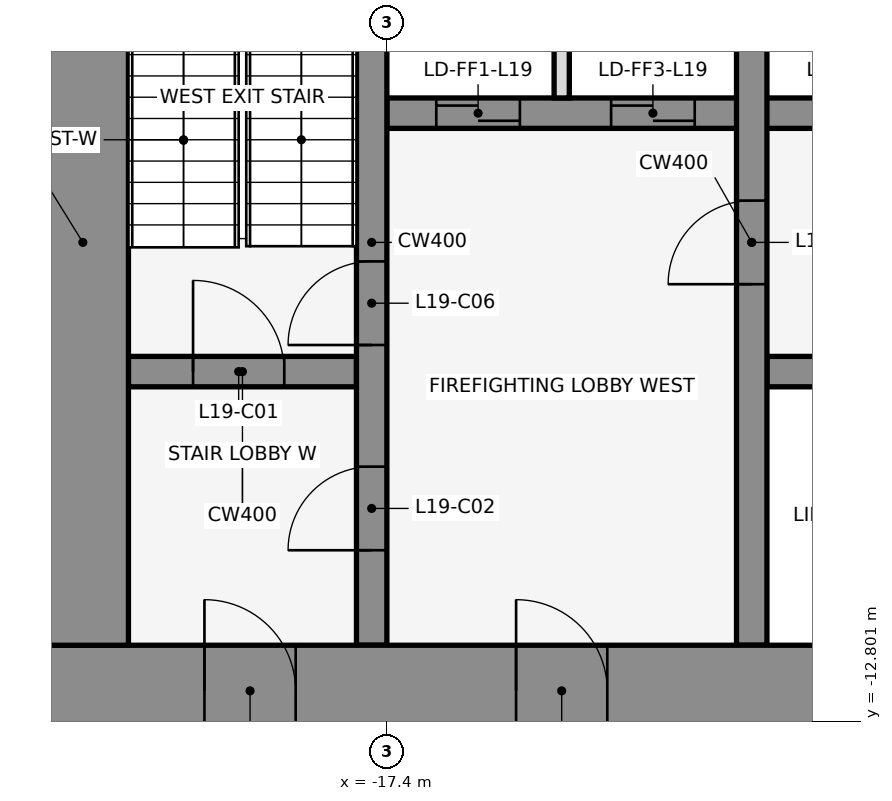
"""IFC4 building model, lengths in metres.
Left out: names, types, materials, properties, quantities, classifications, styles, units other than length and angle.
Written with IfcOpenShell. Run it as: python <this file> out.ifc"""

import sys

from ifc_helpers import new_model, si_unit, direction, frame, frame_2d, origin, place, context, subcontext, project, spatial, rectangle, extrude, element, fill, save


model = new_model("IFC4")
c1 = context("Model", 3, precision=1e-05, world=origin(), true_north=direction((0.0, 1.0)))
c2 = subcontext(c1, "Body", "Model", "MODEL_VIEW")
j1 = project(units=[si_unit("LENGTHUNIT", "METRE"), si_unit("PLANEANGLEUNIT", "RADIAN")], contexts=[c1])
p1 = place(None, origin())
s1 = spatial("IfcSite", under=j1, at=p1, CompositionType="ELEMENT")
p2 = place(p1, origin())
s2 = spatial("IfcBuilding", under=s1, at=p2, CompositionType="ELEMENT")
p3 = place(p2, frame((0.0, 0.0, 94.0)))
s3 = spatial("IfcBuildingStorey", under=s2, at=p3, CompositionType="ELEMENT", Elevation=94.0)
p4 = place(p3, frame((-20.8, -8.2, 0.0), z_axis=(0.0, 0.0, 1.0), x_axis=(1.0, 0.0, 0.0)))
e1 = element("IfcWall", 1, at=p4, inside=s3, PredefinedType="SHEAR", context=c2, shape_type="SweptSolid", body=[
    extrude(rectangle(XDim=3.0, YDim=0.4, at=frame_2d((1.5, 0.0))), origin(), (0.0, 0.0, 1.0), 4.1),
])
p5 = place(p4, frame((0.85, 0.0, 0.0)))
e2 = element("IfcOpeningElement", 2, at=p5, cuts=e1, PredefinedType="OPENING", context=c2, shape_type="SweptSolid", body=[
    extrude(rectangle(XDim=1.2, YDim=2.1, at=frame_2d((0.6, 1.05))), frame((0.0, 0.212, 0.0), z_axis=(0.0, -1.0, 0.0), x_axis=(1.0, 0.0, 0.0)), (0.0, 0.0, 1.0), 0.424),
])
p6 = place(p3, frame((-12.4, -8.2, 0.0), z_axis=(0.0, 0.0, 1.0), x_axis=(1.0, 0.0, 0.0)))
e3 = element("IfcWall", 3, at=p6, inside=s3, PredefinedType="SHEAR", context=c2, shape_type="SweptSolid", body=[
    extrude(rectangle(XDim=6.0, YDim=0.4, at=frame_2d((3.0, 0.0))), origin(), (0.0, 0.0, 1.0), 4.1),
])
p7 = place(p3, frame((-17.4, -4.8, 0.0), z_axis=(0.0, 0.0, 1.0), x_axis=(1.0, 0.0, 0.0)))
e4 = element("IfcWall", 4, at=p7, inside=s3, PredefinedType="SHEAR", context=c2, shape_type="SweptSolid", body=[
    extrude(rectangle(XDim=13.6, YDim=0.4, at=frame_2d((6.8, 0.0))), origin(), (0.0, 0.0, 1.0), 4.1),
])
p8 = place(p7, frame((0.65, 0.0, 0.0)))
e5 = element("IfcOpeningElement", 5, at=p8, cuts=e4, PredefinedType="OPENING", context=c2, shape_type="SweptSolid", body=[
    extrude(rectangle(XDim=1.1, YDim=2.1, at=frame_2d((0.55, 1.05))), frame((0.0, 0.212, 0.0), z_axis=(0.0, -1.0, 0.0), x_axis=(1.0, 0.0, 0.0)), (0.0, 0.0, 1.0), 0.424),
])
p9 = place(p7, frame((2.95, 0.0, 0.0)))
e6 = element("IfcOpeningElement", 6, at=p9, cuts=e4, PredefinedType="OPENING", context=c2, shape_type="SweptSolid", body=[
    extrude(rectangle(XDim=1.1, YDim=2.1, at=frame_2d((0.55, 1.05))), frame((0.0, 0.212, 0.0), z_axis=(0.0, -1.0, 0.0), x_axis=(1.0, 0.0, 0.0)), (0.0, 0.0, 1.0), 0.424),
])
p10 = place(p7, frame((5.65, 0.0, 0.0)))
e7 = element("IfcOpeningElement", 7, at=p10, cuts=e4, PredefinedType="OPENING", context=c2, shape_type="SweptSolid", body=[
    extrude(rectangle(XDim=1.2, YDim=2.1, at=frame_2d((0.6, 1.05))), frame((0.0, 0.212, 0.0), z_axis=(0.0, -1.0, 0.0), x_axis=(1.0, 0.0, 0.0)), (0.0, 0.0, 1.0), 0.424),
])
p11 = place(p7, frame((8.65, 0.0, 0.0)))
e8 = element("IfcOpeningElement", 8, at=p11, cuts=e4, PredefinedType="OPENING", context=c2, shape_type="SweptSolid", body=[
    extrude(rectangle(XDim=1.2, YDim=2.1, at=frame_2d((0.6, 1.05))), frame((0.0, 0.212, 0.0), z_axis=(0.0, -1.0, 0.0), x_axis=(1.0, 0.0, 0.0)), (0.0, 0.0, 1.0), 0.424),
])
p12 = place(p7, frame((11.65, 0.0, 0.0)))
e9 = element("IfcOpeningElement", 9, at=p12, cuts=e4, PredefinedType="OPENING", context=c2, shape_type="SweptSolid", body=[
    extrude(rectangle(XDim=1.2, YDim=2.1, at=frame_2d((0.6, 1.05))), frame((0.0, 0.212, 0.0), z_axis=(0.0, -1.0, 0.0), x_axis=(1.0, 0.0, 0.0)), (0.0, 0.0, 1.0), 0.424),
])
p13 = place(p3, frame((-17.6, -11.8, 0.0), z_axis=(0.0, 0.0, 1.0), x_axis=(0.0, 1.0, 0.0)))
e10 = element("IfcWall", 10, at=p13, inside=s3, PredefinedType="SHEAR", context=c2, shape_type="SweptSolid", body=[
    extrude(rectangle(XDim=10.6, YDim=0.4, at=frame_2d((5.3, 0.0))), origin(), (0.0, 0.0, 1.0), 4.1),
])
p14 = place(p13, frame((1.25, 0.0, 0.0)))
e11 = element("IfcOpeningElement", 11, at=p14, cuts=e10, PredefinedType="OPENING", context=c2, shape_type="SweptSolid", body=[
    extrude(rectangle(XDim=1.1, YDim=2.1, at=frame_2d((0.55, 1.05))), frame((0.0, 0.212, 0.0), z_axis=(0.0, -1.0, 0.0), x_axis=(1.0, 0.0, 0.0)), (0.0, 0.0, 1.0), 0.424),
])
p15 = place(p13, frame((3.95, 0.0, 0.0)))
e12 = element("IfcOpeningElement", 12, at=p15, cuts=e10, PredefinedType="OPENING", context=c2, shape_type="SweptSolid", body=[
    extrude(rectangle(XDim=1.1, YDim=2.1, at=frame_2d((0.55, 1.05))), frame((0.0, 0.212, 0.0), z_axis=(0.0, -1.0, 0.0), x_axis=(1.0, 0.0, 0.0)), (0.0, 0.0, 1.0), 0.424),
])
p16 = place(p3, frame((-15.1, -4.6, 0.0), z_axis=(0.0, 0.0, 1.0), x_axis=(0.0, 1.0, 0.0)))
e13 = element("IfcWall", 13, at=p16, inside=s3, PredefinedType="PARTITIONING", context=c2, shape_type="SweptSolid", body=[
    extrude(rectangle(XDim=3.4, YDim=0.2, at=frame_2d((1.7, 0.0))), origin(), (0.0, 0.0, 1.0), 3.018),
])
p17 = place(p3, frame((-12.6, -11.8, 0.0), z_axis=(0.0, 0.0, 1.0), x_axis=(0.0, 1.0, 0.0)))
e14 = element("IfcWall", 14, at=p17, inside=s3, PredefinedType="SHEAR", context=c2, shape_type="SweptSolid", body=[
    extrude(rectangle(XDim=10.6, YDim=0.4, at=frame_2d((5.3, 0.0))), origin(), (0.0, 0.0, 1.0), 4.1),
])
p18 = place(p17, frame((4.75, 0.0, 0.0)))
e15 = element("IfcOpeningElement", 15, at=p18, cuts=e14, PredefinedType="OPENING", context=c2, shape_type="SweptSolid", body=[
    extrude(rectangle(XDim=1.1, YDim=2.1, at=frame_2d((0.55, 1.05))), frame((0.0, 0.212, 0.0), z_axis=(0.0, -1.0, 0.0), x_axis=(1.0, 0.0, 0.0)), (0.0, 0.0, 1.0), 0.424),
])
p19 = place(p3, frame((-22.0, -12.4, 0.0), z_axis=(0.0, 0.0, 1.0), x_axis=(1.0, 0.0, 0.0)))
e16 = element("IfcWall", 16, at=p19, inside=s3, PredefinedType="SHEAR", context=c2, shape_type="SweptSolid", body=[
    extrude(rectangle(XDim=44.0, YDim=1.2, at=frame_2d((22.0, 0.0))), origin(), (0.0, 0.0, 1.0), 4.1),
])
p20 = place(p19, frame((2.2, 0.0, 0.0)))
e17 = element("IfcOpeningElement", 17, at=p20, cuts=e16, PredefinedType="OPENING", context=c2, shape_type="SweptSolid", body=[
    extrude(rectangle(XDim=1.2, YDim=2.1, at=frame_2d((0.6, 1.05))), frame((0.0, 0.612, 0.0), z_axis=(0.0, -1.0, 0.0), x_axis=(1.0, 0.0, 0.0)), (0.0, 0.0, 1.0), 1.224),
])
p21 = place(p19, frame((21.4, 0.0, 0.0)))
e18 = element("IfcOpeningElement", 18, at=p21, cuts=e16, PredefinedType="OPENING", context=c2, shape_type="SweptSolid", body=[
    extrude(rectangle(XDim=1.2, YDim=2.1, at=frame_2d((0.6, 1.05))), frame((0.0, 0.612, 0.0), z_axis=(0.0, -1.0, 0.0), x_axis=(1.0, 0.0, 0.0)), (0.0, 0.0, 1.0), 1.224),
])
p22 = place(p19, frame((40.6, 0.0, 0.0)))
e19 = element("IfcOpeningElement", 19, at=p22, cuts=e16, PredefinedType="OPENING", context=c2, shape_type="SweptSolid", body=[
    extrude(rectangle(XDim=1.2, YDim=2.1, at=frame_2d((0.6, 1.05))), frame((0.0, 0.612, 0.0), z_axis=(0.0, -1.0, 0.0), x_axis=(1.0, 0.0, 0.0)), (0.0, 0.0, 1.0), 1.224),
])
p23 = place(p19, frame((16.0, 0.0, 0.0)))
e20 = element("IfcOpeningElement", 20, at=p23, cuts=e16, PredefinedType="OPENING", context=c2, shape_type="SweptSolid", body=[
    extrude(rectangle(XDim=1.8, YDim=2.1, at=frame_2d((0.9, 1.05))), frame((0.0, 0.612, 0.0), z_axis=(0.0, -1.0, 0.0), x_axis=(1.0, 0.0, 0.0)), (0.0, 0.0, 1.0), 1.224),
])
p24 = place(p19, frame((6.3, 0.0, 0.0)))
e21 = element("IfcOpeningElement", 21, at=p24, cuts=e16, PredefinedType="OPENING", context=c2, shape_type="SweptSolid", body=[
    extrude(rectangle(XDim=1.2, YDim=2.1, at=frame_2d((0.6, 1.05))), frame((0.0, 0.612, 0.0), z_axis=(0.0, -1.0, 0.0), x_axis=(1.0, 0.0, 0.0)), (0.0, 0.0, 1.0), 1.224),
])
p25 = place(p19, frame((26.2, 0.0, 0.0)))
e22 = element("IfcOpeningElement", 22, at=p25, cuts=e16, PredefinedType="OPENING", context=c2, shape_type="SweptSolid", body=[
    extrude(rectangle(XDim=1.8, YDim=2.1, at=frame_2d((0.9, 1.05))), frame((0.0, 0.612, 0.0), z_axis=(0.0, -1.0, 0.0), x_axis=(1.0, 0.0, 0.0)), (0.0, 0.0, 1.0), 1.224),
])
p26 = place(p19, frame((36.5, 0.0, 0.0)))
e23 = element("IfcOpeningElement", 23, at=p26, cuts=e16, PredefinedType="OPENING", context=c2, shape_type="SweptSolid", body=[
    extrude(rectangle(XDim=1.2, YDim=2.1, at=frame_2d((0.6, 1.05))), frame((0.0, 0.612, 0.0), z_axis=(0.0, -1.0, 0.0), x_axis=(1.0, 0.0, 0.0)), (0.0, 0.0, 1.0), 1.224),
])
p27 = place(p3, frame((-21.4, -11.8, 0.0), z_axis=(0.0, 0.0, 1.0), x_axis=(0.0, 1.0, 0.0)))
e24 = element("IfcWall", 24, at=p27, inside=s3, PredefinedType="SHEAR", context=c2, shape_type="SweptSolid", body=[
    extrude(rectangle(XDim=10.6, YDim=1.2, at=frame_2d((5.3, 0.0))), origin(), (0.0, 0.0, 1.0), 4.1),
])
p28 = place(p5, origin())
e25 = element("IfcDoor", 25, at=p28, inside=s3, OperationType="SINGLE_SWING_LEFT", PredefinedType="DOOR", context=c2, shape_type="SweptSolid", body=[
    extrude(rectangle(XDim=1.2, YDim=2.1, at=frame_2d((0.6, 1.05))), frame((0.0, 0.025, 0.0), z_axis=(0.0, -1.0, 0.0), x_axis=(1.0, 0.0, 0.0)), (0.0, 0.0, 1.0), 0.05),
])
fill(e2, e25)
p29 = place(p14, frame((1.1, 0.0, 0.0), z_axis=(0.0, 0.0, 1.0), x_axis=(-1.0, 0.0, 0.0)))
e26 = element("IfcDoor", 26, at=p29, inside=s3, OperationType="SINGLE_SWING_LEFT", PredefinedType="DOOR", context=c2, shape_type="SweptSolid", body=[
    extrude(rectangle(XDim=1.1, YDim=2.1, at=frame_2d((0.55, 1.05))), frame((0.0, 0.025, 0.0), z_axis=(0.0, -1.0, 0.0), x_axis=(1.0, 0.0, 0.0)), (0.0, 0.0, 1.0), 0.05),
])
fill(e11, e26)
p30 = place(p8, origin())
e27 = element("IfcDoor", 27, at=p30, inside=s3, OperationType="DOUBLE_DOOR_SLIDING", PredefinedType="DOOR", context=c2, shape_type="SweptSolid", body=[
    extrude(rectangle(XDim=1.1, YDim=2.1, at=frame_2d((0.55, 1.05))), frame((0.0, 0.025, 0.0), z_axis=(0.0, -1.0, 0.0), x_axis=(1.0, 0.0, 0.0)), (0.0, 0.0, 1.0), 0.05),
])
fill(e5, e27)
p31 = place(p9, origin())
e28 = element("IfcDoor", 28, at=p31, inside=s3, OperationType="DOUBLE_DOOR_SLIDING", PredefinedType="DOOR", context=c2, shape_type="SweptSolid", body=[
    extrude(rectangle(XDim=1.1, YDim=2.1, at=frame_2d((0.55, 1.05))), frame((0.0, 0.025, 0.0), z_axis=(0.0, -1.0, 0.0), x_axis=(1.0, 0.0, 0.0)), (0.0, 0.0, 1.0), 0.05),
])
fill(e6, e28)
p32 = place(p15, frame((1.1, 0.0, 0.0), z_axis=(0.0, 0.0, 1.0), x_axis=(-1.0, 0.0, 0.0)))
e29 = element("IfcDoor", 29, at=p32, inside=s3, OperationType="SINGLE_SWING_LEFT", PredefinedType="DOOR", context=c2, shape_type="SweptSolid", body=[
    extrude(rectangle(XDim=1.1, YDim=2.1, at=frame_2d((0.55, 1.05))), frame((0.0, 0.025, 0.0), z_axis=(0.0, -1.0, 0.0), x_axis=(1.0, 0.0, 0.0)), (0.0, 0.0, 1.0), 0.05),
])
fill(e12, e29)
p33 = place(p18, origin())
e30 = element("IfcDoor", 30, at=p33, inside=s3, OperationType="SINGLE_SWING_LEFT", PredefinedType="DOOR", context=c2, shape_type="SweptSolid", body=[
    extrude(rectangle(XDim=1.1, YDim=2.1, at=frame_2d((0.55, 1.05))), frame((0.0, 0.025, 0.0), z_axis=(0.0, -1.0, 0.0), x_axis=(1.0, 0.0, 0.0)), (0.0, 0.0, 1.0), 0.05),
])
fill(e15, e30)
p34 = place(p20, frame((1.2, 0.0, 0.0), z_axis=(0.0, 0.0, 1.0), x_axis=(-1.0, 0.0, 0.0)))
e31 = element("IfcDoor", 31, at=p34, inside=s3, OperationType="SINGLE_SWING_RIGHT", PredefinedType="DOOR", context=c2, shape_type="SweptSolid", body=[
    extrude(rectangle(XDim=1.2, YDim=2.1, at=frame_2d((0.6, 1.05))), frame((0.0, 0.025, 0.0), z_axis=(0.0, -1.0, 0.0), x_axis=(1.0, 0.0, 0.0)), (0.0, 0.0, 1.0), 0.05),
])
fill(e17, e31)
p35 = place(p24, frame((1.2, 0.0, 0.0), z_axis=(0.0, 0.0, 1.0), x_axis=(-1.0, 0.0, 0.0)))
e32 = element("IfcDoor", 32, at=p35, inside=s3, OperationType="SINGLE_SWING_RIGHT", PredefinedType="DOOR", context=c2, shape_type="SweptSolid", body=[
    extrude(rectangle(XDim=1.2, YDim=2.1, at=frame_2d((0.6, 1.05))), frame((0.0, 0.025, 0.0), z_axis=(0.0, -1.0, 0.0), x_axis=(1.0, 0.0, 0.0)), (0.0, 0.0, 1.0), 0.05),
])
fill(e21, e32)
save(model, sys.argv[1])
